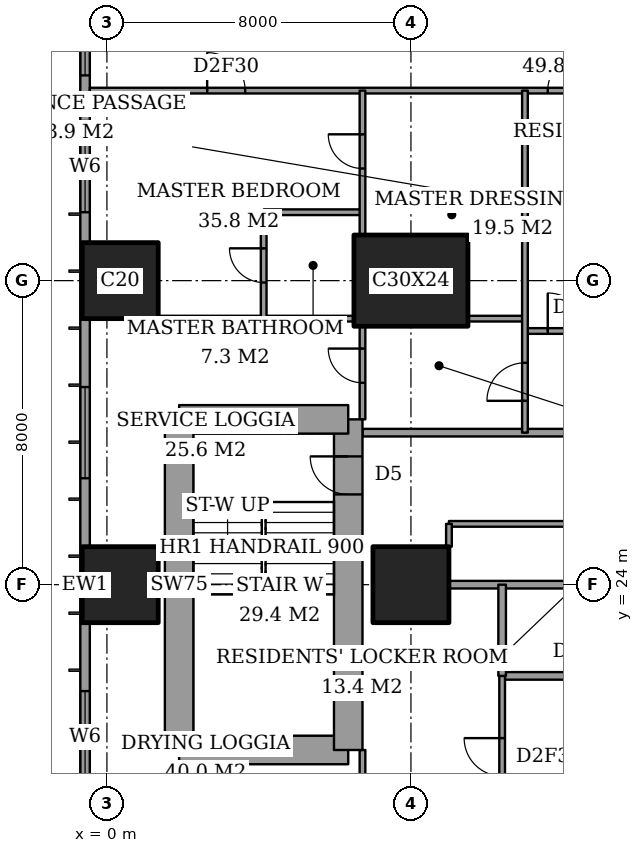
"""IFC4 building model, lengths in metres.
Left out: names, types, materials, properties, quantities, classifications, styles, units other than length and angle.
Written with IfcOpenShell. Run it as: python <this file> out.ifc"""

import sys

from ifc_helpers import new_model, si_unit, direction, frame, frame_2d, origin, origin_2d, place, context, subcontext, project, spatial, rectangle, extrude, element, fill, save


model = new_model("IFC4")
c1 = context("Model", 3, precision=1e-05, world=origin(), true_north=direction((0.0, 1.0)))
c2 = subcontext(c1, "Body", "Model", "MODEL_VIEW")
j1 = project(units=[si_unit("LENGTHUNIT", "METRE"), si_unit("PLANEANGLEUNIT", "RADIAN")], contexts=[c1])
p1 = place(None, origin())
s1 = spatial("IfcSite", under=j1, at=p1, CompositionType="ELEMENT")
p2 = place(p1, origin())
s2 = spatial("IfcBuilding", under=s1, at=p2, CompositionType="ELEMENT")
p3 = place(p2, frame((0.0, 0.0, 29.6)))
s3 = spatial("IfcBuildingStorey", under=s2, at=p3, CompositionType="ELEMENT", Elevation=29.6)
for number, where, z_axis, x_axis in (
    (1, (0.35, 24.0, 0.0), (0.0, 0.0, 1.0), (1.0, 0.0, 0.0)),
    (2, (0.35, 32.0, 0.0), (0.0, 0.0, 1.0), (1.0, 0.0, 0.0)),
    (3, (8.0, 24.0, 0.0), (0.0, 0.0, 1.0), (1.0, 0.0, 0.0)),
):
    element("IfcColumn", number, at=place(p3, frame(where, z_axis=z_axis, x_axis=x_axis)), inside=s3, PredefinedType="COLUMN", context=c2, shape_type="SweptSolid", body=[
        extrude(rectangle(XDim=2.0, YDim=2.0, at=origin_2d()), origin(), (0.0, 0.0, 1.0), 3.6),
    ])
p4 = place(p3, frame((8.0, 32.0, 0.0), z_axis=(0.0, 0.0, 1.0), x_axis=(1.0, 0.0, 0.0)))
e4 = element("IfcColumn", 4, at=p4, inside=s3, PredefinedType="COLUMN", context=c2, shape_type="SweptSolid", body=[
    extrude(rectangle(XDim=3.0, YDim=2.4, at=origin_2d()), origin(), (0.0, 0.0, 1.0), 3.6),
])
p5 = place(p3, frame((1.9, 19.65, 0.0), z_axis=(0.0, 0.0, 1.0), x_axis=(1.0, 0.0, 0.0)))
e5 = element("IfcWall", 5, at=p5, inside=s3, PredefinedType="SHEAR", context=c2, shape_type="SweptSolid", body=[
    extrude(rectangle(XDim=4.45, YDim=0.75, at=frame_2d((2.225, 0.0))), origin(), (0.0, 0.0, 1.0), 3.6),
])
p6 = place(p3, frame((6.35, 19.65, 0.0), z_axis=(0.0, 0.0, 1.0), x_axis=(0.0, 1.0, 0.0)))
e6 = element("IfcWall", 6, at=p6, inside=s3, PredefinedType="SHEAR", context=c2, shape_type="SweptSolid", body=[
    extrude(rectangle(XDim=8.7, YDim=0.75, at=frame_2d((4.35, 0.0))), origin(), (0.0, 0.0, 1.0), 3.6),
])
p7 = place(p6, frame((6.725, 0.0, 0.0)))
e7 = element("IfcOpeningElement", 7, at=p7, cuts=e6, PredefinedType="OPENING", context=c2, shape_type="SweptSolid", body=[
    extrude(rectangle(XDim=1.0, YDim=2.1, at=frame_2d((0.5, 1.05))), frame((0.0, 0.385, 0.0), z_axis=(0.0, -1.0, 0.0), x_axis=(1.0, 0.0, 0.0)), (0.0, 0.0, 1.0), 0.77),
])
p8 = place(p3, frame((6.35, 28.35, 0.0), z_axis=(0.0, 0.0, 1.0), x_axis=(-1.0, 0.0, 0.0)))
e8 = element("IfcWall", 8, at=p8, inside=s3, PredefinedType="SHEAR", context=c2, shape_type="SweptSolid", body=[
    extrude(rectangle(XDim=4.45, YDim=0.75, at=frame_2d((2.225, 0.0))), origin(), (0.0, 0.0, 1.0), 3.6),
])
p9 = place(p3, frame((1.9, 28.35, 0.0), z_axis=(0.0, 0.0, 1.0), x_axis=(0.0, -1.0, 0.0)))
e9 = element("IfcWall", 9, at=p9, inside=s3, PredefinedType="SHEAR", context=c2, shape_type="SweptSolid", body=[
    extrude(rectangle(XDim=8.7, YDim=0.75, at=frame_2d((4.35, 0.0))), origin(), (0.0, 0.0, 1.0), 3.6),
])
p10 = place(p3, frame((-0.575, 44.825, 0.0), z_axis=(0.0, 0.0, 1.0), x_axis=(0.0, -1.0, 0.0)))
e10 = element("IfcWall", 10, at=p10, inside=s3, PredefinedType="SOLIDWALL", context=c2, shape_type="SweptSolid", body=[
    extrude(rectangle(XDim=41.65, YDim=0.25, at=frame_2d((20.825, 0.0))), origin(), (0.0, 0.0, 1.0), 3.6),
])
p11 = place(p10, frame((0.775, 0.0, 0.6)))
e11 = element("IfcOpeningElement", 11, at=p11, cuts=e10, PredefinedType="OPENING", context=c2, shape_type="SweptSolid", body=[
    extrude(rectangle(XDim=2.4, YDim=2.0, at=frame_2d((1.2, 1.0))), frame((0.0, 0.135, 0.0), z_axis=(0.0, -1.0, 0.0), x_axis=(1.0, 0.0, 0.0)), (0.0, 0.0, 1.0), 0.27),
])
p12 = place(p10, frame((6.225, 0.0, 0.6)))
e12 = element("IfcOpeningElement", 12, at=p12, cuts=e10, PredefinedType="OPENING", context=c2, shape_type="SweptSolid", body=[
    extrude(rectangle(XDim=1.2, YDim=2.0, at=frame_2d((0.6, 1.0))), frame((0.0, 0.135, 0.0), z_axis=(0.0, -1.0, 0.0), x_axis=(1.0, 0.0, 0.0)), (0.0, 0.0, 1.0), 0.27),
])
p13 = place(p10, frame((8.625, 0.0, 0.6)))
e13 = element("IfcOpeningElement", 13, at=p13, cuts=e10, PredefinedType="OPENING", context=c2, shape_type="SweptSolid", body=[
    extrude(rectangle(XDim=2.4, YDim=2.0, at=frame_2d((1.2, 1.0))), frame((0.0, 0.135, 0.0), z_axis=(0.0, -1.0, 0.0), x_axis=(1.0, 0.0, 0.0)), (0.0, 0.0, 1.0), 0.27),
])
p14 = place(p10, frame((15.625, 0.0, 0.6)))
e14 = element("IfcOpeningElement", 14, at=p14, cuts=e10, PredefinedType="OPENING", context=c2, shape_type="SweptSolid", body=[
    extrude(rectangle(XDim=2.4, YDim=2.0, at=frame_2d((1.2, 1.0))), frame((0.0, 0.135, 0.0), z_axis=(0.0, -1.0, 0.0), x_axis=(1.0, 0.0, 0.0)), (0.0, 0.0, 1.0), 0.27),
])
p15 = place(p10, frame((23.625, 0.0, 0.6)))
e15 = element("IfcOpeningElement", 15, at=p15, cuts=e10, PredefinedType="OPENING", context=c2, shape_type="SweptSolid", body=[
    extrude(rectangle(XDim=2.4, YDim=2.0, at=frame_2d((1.2, 1.0))), frame((0.0, 0.135, 0.0), z_axis=(0.0, -1.0, 0.0), x_axis=(1.0, 0.0, 0.0)), (0.0, 0.0, 1.0), 0.27),
])
p16 = place(p10, frame((30.825, 0.0, 0.6)))
e16 = element("IfcOpeningElement", 16, at=p16, cuts=e10, PredefinedType="OPENING", context=c2, shape_type="SweptSolid", body=[
    extrude(rectangle(XDim=2.4, YDim=2.0, at=frame_2d((1.2, 1.0))), frame((0.0, 0.135, 0.0), z_axis=(0.0, -1.0, 0.0), x_axis=(1.0, 0.0, 0.0)), (0.0, 0.0, 1.0), 0.27),
])
p17 = place(p10, frame((34.5, 0.0, 0.6)))
e17 = element("IfcOpeningElement", 17, at=p17, cuts=e10, PredefinedType="OPENING", context=c2, shape_type="SweptSolid", body=[
    extrude(rectangle(XDim=1.2, YDim=2.0, at=frame_2d((0.6, 1.0))), frame((0.0, 0.135, 0.0), z_axis=(0.0, -1.0, 0.0), x_axis=(1.0, 0.0, 0.0)), (0.0, 0.0, 1.0), 0.27),
])
p18 = place(p10, frame((38.475, 0.0, 0.6)))
e18 = element("IfcOpeningElement", 18, at=p18, cuts=e10, PredefinedType="OPENING", context=c2, shape_type="SweptSolid", body=[
    extrude(rectangle(XDim=2.4, YDim=2.0, at=frame_2d((1.2, 1.0))), frame((0.0, 0.135, 0.0), z_axis=(0.0, -1.0, 0.0), x_axis=(1.0, 0.0, 0.0)), (0.0, 0.0, 1.0), 0.27),
])
p19 = place(p3, frame((10.4, 21.6, 0.0), z_axis=(0.0, 0.0, 1.0), x_axis=(1.0, 0.0, 0.0)))
e19 = element("IfcWall", 19, at=p19, inside=s3, PredefinedType="PARTITIONING", context=c2, shape_type="SweptSolid", body=[
    extrude(rectangle(XDim=4.4, YDim=0.2, at=frame_2d((2.2, 0.0))), origin(), (0.0, 0.0, 1.0), 3.35),
])
p20 = place(p19, frame((1.75, 0.0, 0.0)))
e20 = element("IfcOpeningElement", 20, at=p20, cuts=e19, PredefinedType="OPENING", context=c2, shape_type="SweptSolid", body=[
    extrude(rectangle(XDim=0.9, YDim=2.1, at=frame_2d((0.45, 1.05))), frame((0.0, 0.11, 0.0), z_axis=(0.0, -1.0, 0.0), x_axis=(1.0, 0.0, 0.0)), (0.0, 0.0, 1.0), 0.22),
])
p21 = place(p3, frame((9.0, 24.0, 0.0), z_axis=(0.0, 0.0, 1.0), x_axis=(1.0, 0.0, 0.0)))
e21 = element("IfcWall", 21, at=p21, inside=s3, PredefinedType="PARTITIONING", context=c2, shape_type="SweptSolid", body=[
    extrude(rectangle(XDim=6.0, YDim=0.2, at=frame_2d((3.0, 0.0))), origin(), (0.0, 0.0, 1.0), 3.35),
])
p22 = place(p3, frame((9.0, 25.6, 0.0), z_axis=(0.0, 0.0, 1.0), x_axis=(1.0, 0.0, 0.0)))
e22 = element("IfcWall", 22, at=p22, inside=s3, PredefinedType="PARTITIONING", context=c2, shape_type="SweptSolid", body=[
    extrude(rectangle(XDim=8.4, YDim=0.15, at=frame_2d((4.2, 0.0))), origin(), (0.0, 0.0, 1.0), 3.35),
])
p23 = place(p22, frame((3.75, 0.0, 0.0)))
e23 = element("IfcOpeningElement", 23, at=p23, cuts=e22, PredefinedType="OPENING", context=c2, shape_type="SweptSolid", body=[
    extrude(rectangle(XDim=0.9, YDim=2.1, at=frame_2d((0.45, 1.05))), frame((0.0, 0.085, 0.0), z_axis=(0.0, -1.0, 0.0), x_axis=(1.0, 0.0, 0.0)), (0.0, 0.0, 1.0), 0.17),
])
p24 = place(p3, frame((6.725, 28.0, 0.0), z_axis=(0.0, 0.0, 1.0), x_axis=(1.0, 0.0, 0.0)))
e24 = element("IfcWall", 24, at=p24, inside=s3, PredefinedType="PARTITIONING", context=c2, shape_type="SweptSolid", body=[
    extrude(rectangle(XDim=17.275, YDim=0.2, at=frame_2d((8.637, 0.0))), origin(), (0.0, 0.0, 1.0), 3.35),
])
p25 = place(p24, frame((7.175, 0.0, 0.0)))
e25 = element("IfcOpeningElement", 25, at=p25, cuts=e24, PredefinedType="OPENING", context=c2, shape_type="SweptSolid", body=[
    extrude(rectangle(XDim=1.2, YDim=2.4, at=frame_2d((0.6, 1.2))), frame((0.0, 0.11, 0.0), z_axis=(0.0, -1.0, 0.0), x_axis=(1.0, 0.0, 0.0)), (0.0, 0.0, 1.0), 0.22),
])
p26 = place(p3, frame((11.0, 30.675, 0.0), z_axis=(0.0, 0.0, 1.0), x_axis=(1.0, 0.0, 0.0)))
e26 = element("IfcWall", 26, at=p26, inside=s3, PredefinedType="PARTITIONING", context=c2, shape_type="SweptSolid", body=[
    extrude(rectangle(XDim=3.4, YDim=0.15, at=frame_2d((1.7, 0.0))), origin(), (0.0, 0.0, 1.0), 3.35),
])
p27 = place(p26, frame((0.6, 0.0, 0.0)))
e27 = element("IfcOpeningElement", 27, at=p27, cuts=e26, PredefinedType="OPENING", context=c2, shape_type="SweptSolid", body=[
    extrude(rectangle(XDim=1.0, YDim=2.1, at=frame_2d((0.5, 1.05))), frame((0.0, 0.085, 0.0), z_axis=(0.0, -1.0, 0.0), x_axis=(1.0, 0.0, 0.0)), (0.0, 0.0, 1.0), 0.17),
])
p28 = place(p3, frame((1.35, 31.0, 0.0), z_axis=(0.0, 0.0, 1.0), x_axis=(1.0, 0.0, 0.0)))
e28 = element("IfcWall", 28, at=p28, inside=s3, PredefinedType="PARTITIONING", context=c2, shape_type="SweptSolid", body=[
    extrude(rectangle(XDim=5.15, YDim=0.15, at=frame_2d((2.575, 0.0))), origin(), (0.0, 0.0, 1.0), 3.35),
])
p29 = place(p3, frame((9.5, 31.0, 0.0), z_axis=(0.0, 0.0, 1.0), x_axis=(1.0, 0.0, 0.0)))
e29 = element("IfcWall", 29, at=p29, inside=s3, PredefinedType="PARTITIONING", context=c2, shape_type="SweptSolid", body=[
    extrude(rectangle(XDim=1.5, YDim=0.15, at=frame_2d((0.75, 0.0))), origin(), (0.0, 0.0, 1.0), 3.35),
])
p30 = place(p3, frame((4.125, 33.8, 0.0), z_axis=(0.0, 0.0, 1.0), x_axis=(1.0, 0.0, 0.0)))
e30 = element("IfcWall", 30, at=p30, inside=s3, PredefinedType="PARTITIONING", context=c2, shape_type="SweptSolid", body=[
    extrude(rectangle(XDim=2.6, YDim=0.15, at=frame_2d((1.3, 0.0))), origin(), (0.0, 0.0, 1.0), 3.35),
])
p31 = place(p3, frame((-0.45, 37.0, 0.0), z_axis=(0.0, 0.0, 1.0), x_axis=(1.0, 0.0, 0.0)))
e31 = element("IfcWall", 31, at=p31, inside=s3, PredefinedType="PARTITIONING", context=c2, shape_type="SweptSolid", body=[
    extrude(rectangle(XDim=25.011, YDim=0.15, at=frame_2d((12.505, 0.0))), origin(), (0.0, 0.0, 1.0), 3.35),
])
p32 = place(p31, frame((12.05, 0.0, 0.0)))
e32 = element("IfcOpeningElement", 32, at=p32, cuts=e31, PredefinedType="OPENING", context=c2, shape_type="SweptSolid", body=[
    extrude(rectangle(XDim=1.0, YDim=2.1, at=frame_2d((0.5, 1.05))), frame((0.0, 0.085, 0.0), z_axis=(0.0, -1.0, 0.0), x_axis=(1.0, 0.0, 0.0)), (0.0, 0.0, 1.0), 0.17),
])
p33 = place(p31, frame((3.087, 0.0, 0.0)))
e33 = element("IfcOpeningElement", 33, at=p33, cuts=e31, PredefinedType="OPENING", context=c2, shape_type="SweptSolid", body=[
    extrude(rectangle(XDim=1.0, YDim=2.1, at=frame_2d((0.5, 1.05))), frame((0.0, 0.085, 0.0), z_axis=(0.0, -1.0, 0.0), x_axis=(1.0, 0.0, 0.0)), (0.0, 0.0, 1.0), 0.17),
])
p34 = place(p31, frame((15.55, 0.0, 0.0)))
e34 = element("IfcOpeningElement", 34, at=p34, cuts=e31, PredefinedType="OPENING", context=c2, shape_type="SweptSolid", body=[
    extrude(rectangle(XDim=1.0, YDim=2.1, at=frame_2d((0.5, 1.05))), frame((0.0, 0.085, 0.0), z_axis=(0.0, -1.0, 0.0), x_axis=(1.0, 0.0, 0.0)), (0.0, 0.0, 1.0), 0.17),
])
p35 = place(p31, frame((21.175, 0.0, 0.0)))
e35 = element("IfcOpeningElement", 35, at=p35, cuts=e31, PredefinedType="OPENING", context=c2, shape_type="SweptSolid", body=[
    extrude(rectangle(XDim=1.0, YDim=2.1, at=frame_2d((0.5, 1.05))), frame((0.0, 0.085, 0.0), z_axis=(0.0, -1.0, 0.0), x_axis=(1.0, 0.0, 0.0)), (0.0, 0.0, 1.0), 0.17),
])
p36 = place(p3, frame((4.125, 31.0, 0.0), z_axis=(0.0, 0.0, 1.0), x_axis=(0.0, 1.0, 0.0)))
e36 = element("IfcWall", 36, at=p36, inside=s3, PredefinedType="PARTITIONING", context=c2, shape_type="SweptSolid", body=[
    extrude(rectangle(XDim=2.8, YDim=0.15, at=frame_2d((1.4, 0.0))), origin(), (0.0, 0.0, 1.0), 3.35),
])
p37 = place(p36, frame((0.95, 0.0, 0.0)))
e37 = element("IfcOpeningElement", 37, at=p37, cuts=e36, PredefinedType="OPENING", context=c2, shape_type="SweptSolid", body=[
    extrude(rectangle(XDim=0.9, YDim=2.1, at=frame_2d((0.45, 1.05))), frame((0.0, 0.085, 0.0), z_axis=(0.0, -1.0, 0.0), x_axis=(1.0, 0.0, 0.0)), (0.0, 0.0, 1.0), 0.17),
])
p38 = place(p3, frame((6.725, 17.2, 0.0), z_axis=(0.0, 0.0, 1.0), x_axis=(0.0, 1.0, 0.0)))
e38 = element("IfcWall", 38, at=p38, inside=s3, PredefinedType="PARTITIONING", context=c2, shape_type="SweptSolid", body=[
    extrude(rectangle(XDim=2.45, YDim=0.15, at=frame_2d((1.225, 0.0))), origin(), (0.0, 0.0, 1.0), 3.35),
])
p39 = place(p38, frame((0.587, 0.0, 0.0)))
e39 = element("IfcOpeningElement", 39, at=p39, cuts=e38, PredefinedType="OPENING", context=c2, shape_type="SweptSolid", body=[
    extrude(rectangle(XDim=0.9, YDim=2.1, at=frame_2d((0.45, 1.05))), frame((0.0, 0.085, 0.0), z_axis=(0.0, -1.0, 0.0), x_axis=(1.0, 0.0, 0.0)), (0.0, 0.0, 1.0), 0.17),
])
p40 = place(p3, frame((6.725, 28.35, 0.0), z_axis=(0.0, 0.0, 1.0), x_axis=(0.0, 1.0, 0.0)))
e40 = element("IfcWall", 40, at=p40, inside=s3, PredefinedType="PARTITIONING", context=c2, shape_type="SweptSolid", body=[
    extrude(rectangle(XDim=2.45, YDim=0.15, at=frame_2d((1.225, 0.0))), origin(), (0.0, 0.0, 1.0), 3.35),
])
p41 = place(p40, frame((0.962, 0.0, 0.0)))
e41 = element("IfcOpeningElement", 41, at=p41, cuts=e40, PredefinedType="OPENING", context=c2, shape_type="SweptSolid", body=[
    extrude(rectangle(XDim=0.9, YDim=2.1, at=frame_2d((0.45, 1.05))), frame((0.0, 0.085, 0.0), z_axis=(0.0, -1.0, 0.0), x_axis=(1.0, 0.0, 0.0)), (0.0, 0.0, 1.0), 0.17),
])
p42 = place(p3, frame((6.725, 33.2, 0.0), z_axis=(0.0, 0.0, 1.0), x_axis=(0.0, 1.0, 0.0)))
e42 = element("IfcWall", 42, at=p42, inside=s3, PredefinedType="PARTITIONING", context=c2, shape_type="SweptSolid", body=[
    extrude(rectangle(XDim=3.8, YDim=0.15, at=frame_2d((1.9, 0.0))), origin(), (0.0, 0.0, 1.0), 3.35),
])
p43 = place(p42, frame((1.75, 0.0, 0.0)))
e43 = element("IfcOpeningElement", 43, at=p43, cuts=e42, PredefinedType="OPENING", context=c2, shape_type="SweptSolid", body=[
    extrude(rectangle(XDim=0.9, YDim=2.1, at=frame_2d((0.45, 1.05))), frame((0.0, 0.085, 0.0), z_axis=(0.0, -1.0, 0.0), x_axis=(1.0, 0.0, 0.0)), (0.0, 0.0, 1.0), 0.17),
])
p44 = place(p3, frame((9.0, 25.0, 0.0), z_axis=(0.0, 0.0, 1.0), x_axis=(0.0, 1.0, 0.0)))
e44 = element("IfcWall", 44, at=p44, inside=s3, PredefinedType="PARTITIONING", context=c2, shape_type="SweptSolid", body=[
    extrude(rectangle(XDim=0.6, YDim=0.15, at=frame_2d((0.3, 0.0))), origin(), (0.0, 0.0, 1.0), 3.35),
])
p45 = place(p3, frame((10.4, 21.6, 0.0), z_axis=(0.0, 0.0, 1.0), x_axis=(0.0, 1.0, 0.0)))
e45 = element("IfcWall", 45, at=p45, inside=s3, PredefinedType="PARTITIONING", context=c2, shape_type="SweptSolid", body=[
    extrude(rectangle(XDim=2.4, YDim=0.2, at=frame_2d((1.2, 0.0))), origin(), (0.0, 0.0, 1.0), 3.35),
])
p46 = place(p3, frame((10.4, 10.6, 0.0), z_axis=(0.0, 0.0, 1.0), x_axis=(0.0, 1.0, 0.0)))
e46 = element("IfcWall", 46, at=p46, inside=s3, PredefinedType="PARTITIONING", context=c2, shape_type="SweptSolid", body=[
    extrude(rectangle(XDim=11.0, YDim=0.15, at=frame_2d((5.5, 0.0))), origin(), (0.0, 0.0, 1.0), 3.35),
])
p47 = place(p46, frame((8.363, 0.0, 0.0)))
e47 = element("IfcOpeningElement", 47, at=p47, cuts=e46, PredefinedType="OPENING", context=c2, shape_type="SweptSolid", body=[
    extrude(rectangle(XDim=1.0, YDim=2.1, at=frame_2d((0.5, 1.05))), frame((0.0, 0.085, 0.0), z_axis=(0.0, -1.0, 0.0), x_axis=(1.0, 0.0, 0.0)), (0.0, 0.0, 1.0), 0.17),
])
p48 = place(p3, frame((11.0, 28.0, 0.0), z_axis=(0.0, 0.0, 1.0), x_axis=(0.0, 1.0, 0.0)))
e48 = element("IfcWall", 48, at=p48, inside=s3, PredefinedType="PARTITIONING", context=c2, shape_type="SweptSolid", body=[
    extrude(rectangle(XDim=9.0, YDim=0.15, at=frame_2d((4.5, 0.0))), origin(), (0.0, 0.0, 1.0), 3.35),
])
p49 = place(p48, frame((0.837, 0.0, 0.0)))
e49 = element("IfcOpeningElement", 49, at=p49, cuts=e48, PredefinedType="OPENING", context=c2, shape_type="SweptSolid", body=[
    extrude(rectangle(XDim=1.0, YDim=2.1, at=frame_2d((0.5, 1.05))), frame((0.0, 0.085, 0.0), z_axis=(0.0, -1.0, 0.0), x_axis=(1.0, 0.0, 0.0)), (0.0, 0.0, 1.0), 0.17),
])
p50 = place(p12, origin())
e50 = element("IfcWindow", 50, at=p50, inside=s3, PartitioningType="SINGLE_PANEL", PredefinedType="WINDOW", context=c2, shape_type="SweptSolid", body=[
    extrude(rectangle(XDim=1.2, YDim=2.0, at=frame_2d((0.6, 1.0))), frame((0.0, 0.03, 0.0), z_axis=(0.0, -1.0, 0.0), x_axis=(1.0, 0.0, 0.0)), (0.0, 0.0, 1.0), 0.06),
])
fill(e12, e50)
p51 = place(p13, origin())
e51 = element("IfcWindow", 51, at=p51, inside=s3, PartitioningType="SINGLE_PANEL", PredefinedType="WINDOW", context=c2, shape_type="SweptSolid", body=[
    extrude(rectangle(XDim=2.4, YDim=2.0, at=frame_2d((1.2, 1.0))), frame((0.0, 0.03, 0.0), z_axis=(0.0, -1.0, 0.0), x_axis=(1.0, 0.0, 0.0)), (0.0, 0.0, 1.0), 0.06),
])
fill(e13, e51)
p52 = place(p14, origin())
e52 = element("IfcWindow", 52, at=p52, inside=s3, PartitioningType="SINGLE_PANEL", PredefinedType="WINDOW", context=c2, shape_type="SweptSolid", body=[
    extrude(rectangle(XDim=2.4, YDim=2.0, at=frame_2d((1.2, 1.0))), frame((0.0, 0.03, 0.0), z_axis=(0.0, -1.0, 0.0), x_axis=(1.0, 0.0, 0.0)), (0.0, 0.0, 1.0), 0.06),
])
fill(e14, e52)
p53 = place(p15, origin())
e53 = element("IfcWindow", 53, at=p53, inside=s3, PartitioningType="SINGLE_PANEL", PredefinedType="WINDOW", context=c2, shape_type="SweptSolid", body=[
    extrude(rectangle(XDim=2.4, YDim=2.0, at=frame_2d((1.2, 1.0))), frame((0.0, 0.03, 0.0), z_axis=(0.0, -1.0, 0.0), x_axis=(1.0, 0.0, 0.0)), (0.0, 0.0, 1.0), 0.06),
])
fill(e15, e53)
p54 = place(p47, origin())
e54 = element("IfcDoor", 54, at=p54, inside=s3, OperationType="SINGLE_SWING_LEFT", PredefinedType="DOOR", context=c2, shape_type="SweptSolid", body=[
    extrude(rectangle(XDim=1.0, YDim=2.1, at=frame_2d((0.5, 1.05))), frame((0.0, 0.025, 0.0), z_axis=(0.0, -1.0, 0.0), x_axis=(1.0, 0.0, 0.0)), (0.0, 0.0, 1.0), 0.05),
])
fill(e47, e54)
p55 = place(p32, origin())
e55 = element("IfcDoor", 55, at=p55, inside=s3, OperationType="SINGLE_SWING_LEFT", PredefinedType="DOOR", context=c2, shape_type="SweptSolid", body=[
    extrude(rectangle(XDim=1.0, YDim=2.1, at=frame_2d((0.5, 1.05))), frame((0.0, 0.025, 0.0), z_axis=(0.0, -1.0, 0.0), x_axis=(1.0, 0.0, 0.0)), (0.0, 0.0, 1.0), 0.05),
])
fill(e32, e55)
p56 = place(p37, origin())
e56 = element("IfcDoor", 56, at=p56, inside=s3, OperationType="SINGLE_SWING_LEFT", PredefinedType="DOOR", context=c2, shape_type="SweptSolid", body=[
    extrude(rectangle(XDim=0.9, YDim=2.1, at=frame_2d((0.45, 1.05))), frame((0.0, 0.025, 0.0), z_axis=(0.0, -1.0, 0.0), x_axis=(1.0, 0.0, 0.0)), (0.0, 0.0, 1.0), 0.05),
])
fill(e37, e56)
p57 = place(p33, origin())
e57 = element("IfcDoor", 57, at=p57, inside=s3, OperationType="SINGLE_SWING_RIGHT", PredefinedType="DOOR", context=c2, shape_type="SweptSolid", body=[
    extrude(rectangle(XDim=1.0, YDim=2.1, at=frame_2d((0.5, 1.05))), frame((0.0, 0.025, 0.0), z_axis=(0.0, -1.0, 0.0), x_axis=(1.0, 0.0, 0.0)), (0.0, 0.0, 1.0), 0.05),
])
fill(e33, e57)
p58 = place(p41, origin())
e58 = element("IfcDoor", 58, at=p58, inside=s3, OperationType="SINGLE_SWING_LEFT", PredefinedType="DOOR", context=c2, shape_type="SweptSolid", body=[
    extrude(rectangle(XDim=0.9, YDim=2.1, at=frame_2d((0.45, 1.05))), frame((0.0, 0.025, 0.0), z_axis=(0.0, -1.0, 0.0), x_axis=(1.0, 0.0, 0.0)), (0.0, 0.0, 1.0), 0.05),
])
fill(e41, e58)
p59 = place(p43, origin())
e59 = element("IfcDoor", 59, at=p59, inside=s3, OperationType="SINGLE_SWING_LEFT", PredefinedType="DOOR", context=c2, shape_type="SweptSolid", body=[
    extrude(rectangle(XDim=0.9, YDim=2.1, at=frame_2d((0.45, 1.05))), frame((0.0, 0.025, 0.0), z_axis=(0.0, -1.0, 0.0), x_axis=(1.0, 0.0, 0.0)), (0.0, 0.0, 1.0), 0.05),
])
fill(e43, e59)
p60 = place(p49, origin())
e60 = element("IfcDoor", 60, at=p60, inside=s3, OperationType="SINGLE_SWING_RIGHT", PredefinedType="DOOR", context=c2, shape_type="SweptSolid", body=[
    extrude(rectangle(XDim=1.0, YDim=2.1, at=frame_2d((0.5, 1.05))), frame((0.0, 0.025, 0.0), z_axis=(0.0, -1.0, 0.0), x_axis=(1.0, 0.0, 0.0)), (0.0, 0.0, 1.0), 0.05),
])
fill(e49, e60)
p61 = place(p27, origin())
e61 = element("IfcDoor", 61, at=p61, inside=s3, OperationType="SINGLE_SWING_RIGHT", PredefinedType="DOOR", context=c2, shape_type="SweptSolid", body=[
    extrude(rectangle(XDim=1.0, YDim=2.1, at=frame_2d((0.5, 1.05))), frame((0.0, 0.025, 0.0), z_axis=(0.0, -1.0, 0.0), x_axis=(1.0, 0.0, 0.0)), (0.0, 0.0, 1.0), 0.05),
])
fill(e27, e61)
p62 = place(p7, origin())
e62 = element("IfcDoor", 62, at=p62, inside=s3, OperationType="SINGLE_SWING_LEFT", PredefinedType="DOOR", context=c2, shape_type="SweptSolid", body=[
    extrude(rectangle(XDim=1.0, YDim=2.1, at=frame_2d((0.5, 1.05))), frame((0.0, 0.025, 0.0), z_axis=(0.0, -1.0, 0.0), x_axis=(1.0, 0.0, 0.0)), (0.0, 0.0, 1.0), 0.05),
])
fill(e7, e62)
save(model, sys.argv[1])
